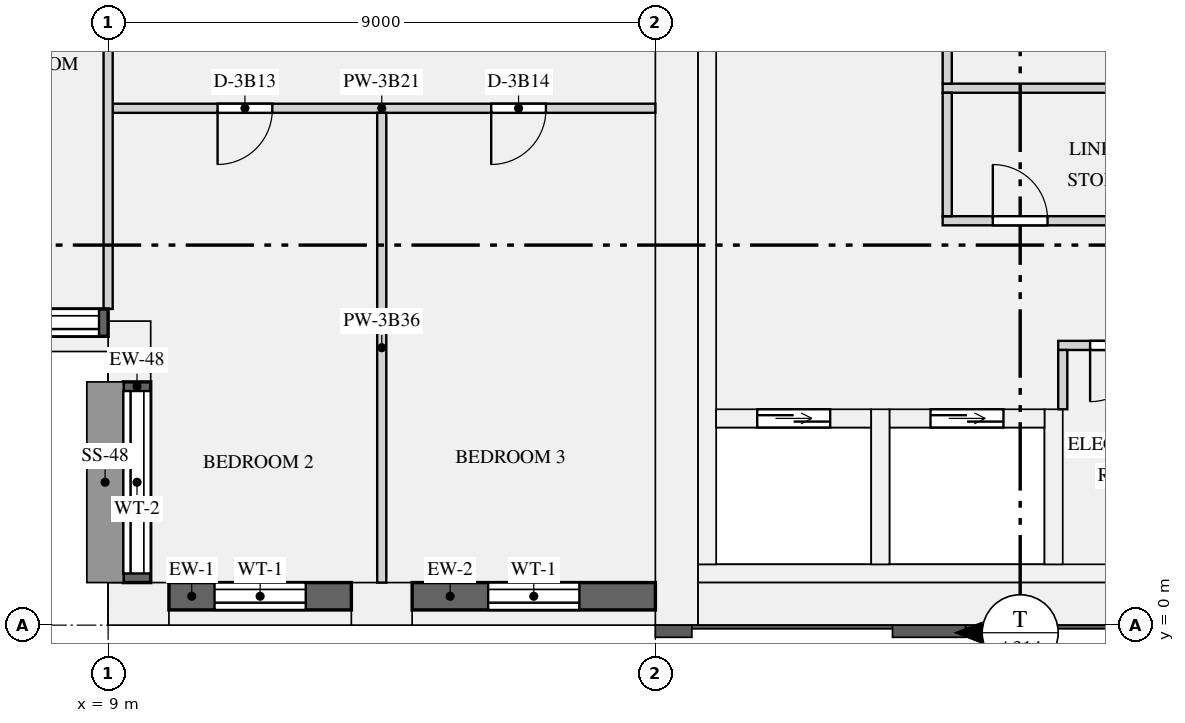
"""IFC4 building model, lengths in metres.
Left out: names, types, materials, properties, quantities, classifications, styles, units other than length and angle.
Written with IfcOpenShell. Run it as: python <this file> out.ifc"""

import sys

from ifc_helpers import new_model, si_unit, direction, frame, frame_2d, origin, origin_2d, place, context, subcontext, project, spatial, rectangle, extrude, element, fill, save


model = new_model("IFC4")
c1 = context("Model", 3, precision=1e-05, world=origin(), true_north=direction((0.0, 1.0)))
c2 = subcontext(c1, "Body", "Model", "MODEL_VIEW")
j1 = project(units=[si_unit("LENGTHUNIT", "METRE"), si_unit("PLANEANGLEUNIT", "RADIAN")], contexts=[c1])
p1 = place(None, origin())
s1 = spatial("IfcSite", under=j1, at=p1, CompositionType="ELEMENT")
p2 = place(p1, origin())
s2 = spatial("IfcBuilding", under=s1, at=p2, CompositionType="ELEMENT")
p3 = place(p2, frame((0.0, 0.0, 150.75)))
s3 = spatial("IfcBuildingStorey", under=s2, at=p3, CompositionType="ELEMENT", Elevation=150.75)
for number, where, z_axis, x_axis in (
    (1, (9.5, 0.35, 0.0), (0.0, 0.0, 1.0), (1.0, 0.0, 0.0)),
    (2, (13.5, 0.35, 0.0), (0.0, 0.0, 1.0), (1.0, 0.0, 0.0)),
    (3, (9.35, 4.5, 0.0), (0.0, 0.0, 1.0), (0.0, -1.0, 0.0)),
):
    element("IfcColumn", number, at=place(p3, frame(where, z_axis=z_axis, x_axis=x_axis)), inside=s3, PredefinedType="USERDEFINED", context=c2, shape_type="SweptSolid", body=[
        extrude(rectangle(XDim=1.0, YDim=0.7, at=origin_2d()), origin(), (0.0, 0.0, 1.0), 3.15),
    ])
p4 = place(p3, frame((18.35, 0.0, 0.0), z_axis=(0.0, 0.0, 1.0), x_axis=(0.0, 1.0, 0.0)))
e4 = element("IfcWall", 4, at=p4, inside=s3, PredefinedType="SHEAR", context=c2, shape_type="SweptSolid", body=[
    extrude(rectangle(XDim=12.5, YDim=0.7, at=frame_2d((6.25, 0.0))), origin(), (0.0, 0.0, 1.0), 3.15),
])
p5 = place(p3, frame((18.7, 0.35, 0.0), z_axis=(0.0, 0.0, 1.0), x_axis=(1.0, 0.0, 0.0)))
e5 = element("IfcWall", 5, at=p5, inside=s3, PredefinedType="SHEAR", context=c2, shape_type="SweptSolid", body=[
    extrude(rectangle(XDim=34.6, YDim=0.7, at=frame_2d((17.3, 0.0))), origin(), (0.0, 0.0, 1.0), 3.15),
])
p6 = place(p3, frame((18.85, 1.0, 0.0), z_axis=(0.0, 0.0, 1.0), x_axis=(0.0, 1.0, 0.0)))
e6 = element("IfcWall", 6, at=p6, inside=s3, PredefinedType="SHEAR", context=c2, shape_type="SweptSolid", body=[
    extrude(rectangle(XDim=10.9, YDim=0.3, at=frame_2d((5.45, 0.0))), origin(), (0.0, 0.0, 1.0), 3.15),
])
p7 = place(p3, frame((18.7, 0.85, 0.0), z_axis=(0.0, 0.0, 1.0), x_axis=(1.0, 0.0, 0.0)))
e7 = element("IfcWall", 7, at=p7, inside=s3, PredefinedType="SHEAR", context=c2, shape_type="SweptSolid", body=[
    extrude(rectangle(XDim=34.6, YDim=0.3, at=frame_2d((17.3, 0.0))), origin(), (0.0, 0.0, 1.0), 3.15),
])
p8 = place(p3, frame((19.0, 3.4, 0.0), z_axis=(0.0, 0.0, 1.0), x_axis=(1.0, 0.0, 0.0)))
e8 = element("IfcWall", 8, at=p8, inside=s3, PredefinedType="SHEAR", context=c2, shape_type="SweptSolid", body=[
    extrude(rectangle(XDim=2.55, YDim=0.3, at=frame_2d((1.275, 0.0))), origin(), (0.0, 0.0, 1.0), 3.15),
])
p9 = place(p8, frame((0.675, 0.0, 0.0)))
e9 = element("IfcOpeningElement", 9, at=p9, cuts=e8, PredefinedType="OPENING", context=c2, shape_type="SweptSolid", body=[
    extrude(rectangle(XDim=1.2, YDim=2.1, at=frame_2d((0.6, 1.05))), frame((0.0, 0.16, 0.0), z_axis=(0.0, -1.0, 0.0), x_axis=(1.0, 0.0, 0.0)), (0.0, 0.0, 1.0), 0.32),
])
p10 = place(p3, frame((21.85, 3.4, 0.0), z_axis=(0.0, 0.0, 1.0), x_axis=(1.0, 0.0, 0.0)))
e10 = element("IfcWall", 10, at=p10, inside=s3, PredefinedType="SHEAR", context=c2, shape_type="SweptSolid", body=[
    extrude(rectangle(XDim=2.55, YDim=0.3, at=frame_2d((1.275, 0.0))), origin(), (0.0, 0.0, 1.0), 3.15),
])
p11 = place(p10, frame((0.675, 0.0, 0.0)))
e11 = element("IfcOpeningElement", 11, at=p11, cuts=e10, PredefinedType="OPENING", context=c2, shape_type="SweptSolid", body=[
    extrude(rectangle(XDim=1.2, YDim=2.1, at=frame_2d((0.6, 1.05))), frame((0.0, 0.16, 0.0), z_axis=(0.0, -1.0, 0.0), x_axis=(1.0, 0.0, 0.0)), (0.0, 0.0, 1.0), 0.32),
])
for number, where, z_axis, x_axis in (
    (12, (21.7, 1.0, 0.0), (0.0, 0.0, 1.0), (0.0, 1.0, 0.0)),
    (13, (24.55, 1.0, 0.0), (0.0, 0.0, 1.0), (0.0, 1.0, 0.0)),
):
    element("IfcWall", number, at=place(p3, frame(where, z_axis=z_axis, x_axis=x_axis)), inside=s3, PredefinedType="SHEAR", context=c2, shape_type="SweptSolid", body=[
        extrude(rectangle(XDim=2.55, YDim=0.3, at=frame_2d((1.275, 0.0))), origin(), (0.0, 0.0, 1.0), 3.15),
    ])
p12 = place(p3, frame((10.0, 0.475, 0.9), z_axis=(0.0, 0.0, 1.0), x_axis=(1.0, 0.0, 0.0)))
e14 = element("IfcWall", 14, at=p12, inside=s3, PredefinedType="SOLIDWALL", context=c2, shape_type="SweptSolid", body=[
    extrude(rectangle(XDim=3.0, YDim=0.45, at=frame_2d((1.5, 0.0))), origin(), (0.0, 0.0, 1.0), 1.93),
])
p13 = place(p12, frame((0.75, 0.0, 0.15)))
e15 = element("IfcOpeningElement", 15, at=p13, cuts=e14, PredefinedType="OPENING", context=c2, shape_type="SweptSolid", body=[
    extrude(rectangle(XDim=1.5, YDim=1.5, at=frame_2d((0.75, 0.75))), frame((0.0, 0.235, 0.0), z_axis=(0.0, -1.0, 0.0), x_axis=(1.0, 0.0, 0.0)), (0.0, 0.0, 1.0), 0.47),
])
p14 = place(p3, frame((14.0, 0.475, 0.9), z_axis=(0.0, 0.0, 1.0), x_axis=(1.0, 0.0, 0.0)))
e16 = element("IfcWall", 16, at=p14, inside=s3, PredefinedType="SOLIDWALL", context=c2, shape_type="SweptSolid", body=[
    extrude(rectangle(XDim=4.0, YDim=0.45, at=frame_2d((2.0, 0.0))), origin(), (0.0, 0.0, 1.0), 1.93),
])
p15 = place(p14, frame((1.25, 0.0, 0.15)))
e17 = element("IfcOpeningElement", 17, at=p15, cuts=e16, PredefinedType="OPENING", context=c2, shape_type="SweptSolid", body=[
    extrude(rectangle(XDim=1.5, YDim=1.5, at=frame_2d((0.75, 0.75))), frame((0.0, 0.235, 0.0), z_axis=(0.0, -1.0, 0.0), x_axis=(1.0, 0.0, 0.0)), (0.0, 0.0, 1.0), 0.47),
])
p16 = place(p3, frame((5.5, 4.975, 0.9), z_axis=(0.0, 0.0, 1.0), x_axis=(1.0, 0.0, 0.0)))
e18 = element("IfcWall", 18, at=p16, inside=s3, PredefinedType="SOLIDWALL", context=c2, shape_type="SweptSolid", body=[
    extrude(rectangle(XDim=3.5, YDim=0.45, at=frame_2d((1.75, 0.0))), origin(), (0.0, 0.0, 1.0), 1.93),
])
p17 = place(p16, frame((0.15, 0.0, 0.15)))
e19 = element("IfcOpeningElement", 19, at=p17, cuts=e18, PredefinedType="OPENING", context=c2, shape_type="SweptSolid", body=[
    extrude(rectangle(XDim=3.2, YDim=1.5, at=frame_2d((1.6, 0.75))), frame((0.0, 0.235, 0.0), z_axis=(0.0, -1.0, 0.0), x_axis=(1.0, 0.0, 0.0)), (0.0, 0.0, 1.0), 0.47),
])
p18 = place(p3, frame((9.475, 4.0, 0.9), z_axis=(0.0, 0.0, 1.0), x_axis=(0.0, -1.0, 0.0)))
e20 = element("IfcWall", 20, at=p18, inside=s3, PredefinedType="SOLIDWALL", context=c2, shape_type="SweptSolid", body=[
    extrude(rectangle(XDim=3.3, YDim=0.45, at=frame_2d((1.65, 0.0))), origin(), (0.0, 0.0, 1.0), 1.93),
])
p19 = place(p18, frame((0.15, 0.0, 0.15)))
e21 = element("IfcOpeningElement", 21, at=p19, cuts=e20, PredefinedType="OPENING", context=c2, shape_type="SweptSolid", body=[
    extrude(rectangle(XDim=3.0, YDim=1.5, at=frame_2d((1.5, 0.75))), frame((0.0, 0.235, 0.0), z_axis=(0.0, -1.0, 0.0), x_axis=(1.0, 0.0, 0.0)), (0.0, 0.0, 1.0), 0.47),
])
p20 = place(p3, frame((24.625, 4.6, 0.0), z_axis=(0.0, 0.0, 1.0), x_axis=(1.0, 0.0, 0.0)))
e22 = element("IfcWall", 22, at=p20, inside=s3, PredefinedType="PARTITIONING", context=c2, shape_type="SweptSolid", body=[
    extrude(rectangle(XDim=2.675, YDim=0.15, at=frame_2d((1.337, 0.0))), origin(), (0.0, 0.0, 1.0), 2.83),
])
p21 = place(p20, frame((0.525, 0.0, 0.0)))
e23 = element("IfcOpeningElement", 23, at=p21, cuts=e22, PredefinedType="OPENING", context=c2, shape_type="SweptSolid", body=[
    extrude(rectangle(XDim=0.9, YDim=2.1, at=frame_2d((0.45, 1.05))), frame((0.0, 0.085, 0.0), z_axis=(0.0, -1.0, 0.0), x_axis=(1.0, 0.0, 0.0)), (0.0, 0.0, 1.0), 0.17),
])
p22 = place(p3, frame((22.725, 6.65, 0.0), z_axis=(0.0, 0.0, 1.0), x_axis=(1.0, 0.0, 0.0)))
e24 = element("IfcWall", 24, at=p22, inside=s3, PredefinedType="PARTITIONING", context=c2, shape_type="SweptSolid", body=[
    extrude(rectangle(XDim=19.8, YDim=0.15, at=frame_2d((9.9, 0.0))), origin(), (0.0, 0.0, 1.0), 2.83),
])
p23 = place(p22, frame((0.825, 0.0, 0.0)))
e25 = element("IfcOpeningElement", 25, at=p23, cuts=e24, PredefinedType="OPENING", context=c2, shape_type="SweptSolid", body=[
    extrude(rectangle(XDim=0.9, YDim=2.1, at=frame_2d((0.45, 1.05))), frame((0.0, 0.085, 0.0), z_axis=(0.0, -1.0, 0.0), x_axis=(1.0, 0.0, 0.0)), (0.0, 0.0, 1.0), 0.17),
])
p24 = place(p22, frame((4.825, 0.0, 0.0)))
e26 = element("IfcOpeningElement", 26, at=p24, cuts=e24, PredefinedType="OPENING", context=c2, shape_type="SweptSolid", body=[
    extrude(rectangle(XDim=0.9, YDim=2.1, at=frame_2d((0.45, 1.05))), frame((0.0, 0.085, 0.0), z_axis=(0.0, -1.0, 0.0), x_axis=(1.0, 0.0, 0.0)), (0.0, 0.0, 1.0), 0.17),
])
p25 = place(p22, frame((9.825, 0.0, 0.0)))
e27 = element("IfcOpeningElement", 27, at=p25, cuts=e24, PredefinedType="OPENING", context=c2, shape_type="SweptSolid", body=[
    extrude(rectangle(XDim=0.9, YDim=2.1, at=frame_2d((0.45, 1.05))), frame((0.0, 0.085, 0.0), z_axis=(0.0, -1.0, 0.0), x_axis=(1.0, 0.0, 0.0)), (0.0, 0.0, 1.0), 0.17),
])
p26 = place(p22, frame((14.475, 0.0, 0.0)))
e28 = element("IfcOpeningElement", 28, at=p26, cuts=e24, PredefinedType="OPENING", context=c2, shape_type="SweptSolid", body=[
    extrude(rectangle(XDim=0.9, YDim=2.1, at=frame_2d((0.45, 1.05))), frame((0.0, 0.085, 0.0), z_axis=(0.0, -1.0, 0.0), x_axis=(1.0, 0.0, 0.0)), (0.0, 0.0, 1.0), 0.17),
])
p27 = place(p3, frame((22.725, 8.83, 0.0), z_axis=(0.0, 0.0, 1.0), x_axis=(1.0, 0.0, 0.0)))
e29 = element("IfcWall", 29, at=p27, inside=s3, PredefinedType="PARTITIONING", context=c2, shape_type="SweptSolid", body=[
    extrude(rectangle(XDim=8.96, YDim=0.15, at=frame_2d((4.48, 0.0))), origin(), (0.0, 0.0, 1.0), 2.83),
])
p28 = place(p3, frame((24.7, 3.55, 0.0), z_axis=(0.0, 0.0, 1.0), x_axis=(0.0, 1.0, 0.0)))
e30 = element("IfcWall", 30, at=p28, inside=s3, PredefinedType="PARTITIONING", context=c2, shape_type="SweptSolid", body=[
    extrude(rectangle(XDim=0.975, YDim=0.15, at=frame_2d((0.487, 0.0))), origin(), (0.0, 0.0, 1.0), 2.83),
])
p29 = place(p3, frame((22.8, 6.725, 0.0), z_axis=(0.0, 0.0, 1.0), x_axis=(0.0, 1.0, 0.0)))
e31 = element("IfcWall", 31, at=p29, inside=s3, PredefinedType="PARTITIONING", context=c2, shape_type="SweptSolid", body=[
    extrude(rectangle(XDim=2.03, YDim=0.15, at=frame_2d((1.015, 0.0))), origin(), (0.0, 0.0, 1.0), 2.83),
])
p30 = place(p3, frame((22.8, 8.905, 0.0), z_axis=(0.0, 0.0, 1.0), x_axis=(0.0, 1.0, 0.0)))
e32 = element("IfcWall", 32, at=p30, inside=s3, PredefinedType="PARTITIONING", context=c2, shape_type="SweptSolid", body=[
    extrude(rectangle(XDim=2.995, YDim=0.15, at=frame_2d((1.498, 0.0))), origin(), (0.0, 0.0, 1.0), 2.83),
])
p31 = place(p3, frame((9.075, 8.5, 0.0), z_axis=(0.0, 0.0, 1.0), x_axis=(1.0, 0.0, 0.0)))
e33 = element("IfcWall", 33, at=p31, inside=s3, PredefinedType="PARTITIONING", context=c2, shape_type="SweptSolid", body=[
    extrude(rectangle(XDim=8.925, YDim=0.15, at=frame_2d((4.462, 0.0))), origin(), (0.0, 0.0, 1.0), 2.83),
])
p32 = place(p31, frame((1.725, 0.0, 0.0)))
e34 = element("IfcOpeningElement", 34, at=p32, cuts=e33, PredefinedType="OPENING", context=c2, shape_type="SweptSolid", body=[
    extrude(rectangle(XDim=0.9, YDim=2.1, at=frame_2d((0.45, 1.05))), frame((0.0, 0.085, 0.0), z_axis=(0.0, -1.0, 0.0), x_axis=(1.0, 0.0, 0.0)), (0.0, 0.0, 1.0), 0.17),
])
p33 = place(p31, frame((6.225, 0.0, 0.0)))
e35 = element("IfcOpeningElement", 35, at=p33, cuts=e33, PredefinedType="OPENING", context=c2, shape_type="SweptSolid", body=[
    extrude(rectangle(XDim=0.9, YDim=2.1, at=frame_2d((0.45, 1.05))), frame((0.0, 0.085, 0.0), z_axis=(0.0, -1.0, 0.0), x_axis=(1.0, 0.0, 0.0)), (0.0, 0.0, 1.0), 0.17),
])
p34 = place(p3, frame((13.5, 0.7, 0.0), z_axis=(0.0, 0.0, 1.0), x_axis=(0.0, 1.0, 0.0)))
e36 = element("IfcWall", 36, at=p34, inside=s3, PredefinedType="PARTITIONING", context=c2, shape_type="SweptSolid", body=[
    extrude(rectangle(XDim=7.725, YDim=0.15, at=frame_2d((3.863, 0.0))), origin(), (0.0, 0.0, 1.0), 2.83),
])
p35 = place(p3, frame((9.0, 5.2, 0.0), z_axis=(0.0, 0.0, 1.0), x_axis=(0.0, 1.0, 0.0)))
e37 = element("IfcWall", 37, at=p35, inside=s3, PredefinedType="PARTITIONING", context=c2, shape_type="SweptSolid", body=[
    extrude(rectangle(XDim=11.225, YDim=0.15, at=frame_2d((5.613, 0.0))), origin(), (0.0, 0.0, 1.0), 2.83),
])
p36 = place(p35, frame((4.575, 0.0, 0.0)))
e38 = element("IfcOpeningElement", 38, at=p36, cuts=e37, PredefinedType="OPENING", context=c2, shape_type="SweptSolid", body=[
    extrude(rectangle(XDim=0.9, YDim=2.1, at=frame_2d((0.45, 1.05))), frame((0.0, 0.085, 0.0), z_axis=(0.0, -1.0, 0.0), x_axis=(1.0, 0.0, 0.0)), (0.0, 0.0, 1.0), 0.17),
])
p37 = place(p13, origin())
e39 = element("IfcWindow", 39, at=p37, inside=s3, PartitioningType="SINGLE_PANEL", PredefinedType="WINDOW", context=c2, shape_type="SweptSolid", body=[
    extrude(rectangle(XDim=1.5, YDim=1.5, at=frame_2d((0.75, 0.75))), frame((0.0, -0.065, 0.0), z_axis=(0.0, -1.0, 0.0), x_axis=(1.0, 0.0, 0.0)), (0.0, 0.0, 1.0), 0.06),
])
fill(e15, e39)
p38 = place(p15, origin())
e40 = element("IfcWindow", 40, at=p38, inside=s3, PartitioningType="SINGLE_PANEL", PredefinedType="WINDOW", context=c2, shape_type="SweptSolid", body=[
    extrude(rectangle(XDim=1.5, YDim=1.5, at=frame_2d((0.75, 0.75))), frame((0.0, -0.065, 0.0), z_axis=(0.0, -1.0, 0.0), x_axis=(1.0, 0.0, 0.0)), (0.0, 0.0, 1.0), 0.06),
])
fill(e17, e40)
p39 = place(p17, origin())
e41 = element("IfcWindow", 41, at=p39, inside=s3, PartitioningType="SINGLE_PANEL", PredefinedType="WINDOW", context=c2, shape_type="SweptSolid", body=[
    extrude(rectangle(XDim=3.2, YDim=1.5, at=frame_2d((1.6, 0.75))), frame((0.0, -0.065, 0.0), z_axis=(0.0, -1.0, 0.0), x_axis=(1.0, 0.0, 0.0)), (0.0, 0.0, 1.0), 0.06),
])
fill(e19, e41)
p40 = place(p19, origin())
e42 = element("IfcWindow", 42, at=p40, inside=s3, PartitioningType="SINGLE_PANEL", PredefinedType="WINDOW", context=c2, shape_type="SweptSolid", body=[
    extrude(rectangle(XDim=3.0, YDim=1.5, at=frame_2d((1.5, 0.75))), frame((0.0, -0.065, 0.0), z_axis=(0.0, -1.0, 0.0), x_axis=(1.0, 0.0, 0.0)), (0.0, 0.0, 1.0), 0.06),
])
fill(e21, e42)
p41 = place(p9, origin())
e43 = element("IfcDoor", 43, at=p41, inside=s3, OperationType="DOUBLE_DOOR_SLIDING", PredefinedType="DOOR", context=c2, shape_type="SweptSolid", body=[
    extrude(rectangle(XDim=1.2, YDim=2.1, at=frame_2d((0.6, 1.05))), frame((0.0, 0.025, 0.0), z_axis=(0.0, -1.0, 0.0), x_axis=(1.0, 0.0, 0.0)), (0.0, 0.0, 1.0), 0.05),
])
fill(e9, e43)
p42 = place(p11, origin())
e44 = element("IfcDoor", 44, at=p42, inside=s3, OperationType="DOUBLE_DOOR_SLIDING", PredefinedType="DOOR", context=c2, shape_type="SweptSolid", body=[
    extrude(rectangle(XDim=1.2, YDim=2.1, at=frame_2d((0.6, 1.05))), frame((0.0, 0.025, 0.0), z_axis=(0.0, -1.0, 0.0), x_axis=(1.0, 0.0, 0.0)), (0.0, 0.0, 1.0), 0.05),
])
fill(e11, e44)
p43 = place(p21, frame((0.9, 0.0, 0.0), z_axis=(0.0, 0.0, 1.0), x_axis=(-1.0, 0.0, 0.0)))
e45 = element("IfcDoor", 45, at=p43, inside=s3, OperationType="SINGLE_SWING_RIGHT", PredefinedType="DOOR", context=c2, shape_type="SweptSolid", body=[
    extrude(rectangle(XDim=0.9, YDim=2.1, at=frame_2d((0.45, 1.05))), frame((0.0, 0.025, 0.0), z_axis=(0.0, -1.0, 0.0), x_axis=(1.0, 0.0, 0.0)), (0.0, 0.0, 1.0), 0.05),
])
fill(e23, e45)
p44 = place(p23, origin())
e46 = element("IfcDoor", 46, at=p44, inside=s3, OperationType="SINGLE_SWING_LEFT", PredefinedType="DOOR", context=c2, shape_type="SweptSolid", body=[
    extrude(rectangle(XDim=0.9, YDim=2.1, at=frame_2d((0.45, 1.05))), frame((0.0, 0.025, 0.0), z_axis=(0.0, -1.0, 0.0), x_axis=(1.0, 0.0, 0.0)), (0.0, 0.0, 1.0), 0.05),
])
fill(e25, e46)
p45 = place(p32, frame((0.9, 0.0, 0.0), z_axis=(0.0, 0.0, 1.0), x_axis=(-1.0, 0.0, 0.0)))
e47 = element("IfcDoor", 47, at=p45, inside=s3, OperationType="SINGLE_SWING_RIGHT", PredefinedType="DOOR", context=c2, shape_type="SweptSolid", body=[
    extrude(rectangle(XDim=0.9, YDim=2.1, at=frame_2d((0.45, 1.05))), frame((0.0, 0.025, 0.0), z_axis=(0.0, -1.0, 0.0), x_axis=(1.0, 0.0, 0.0)), (0.0, 0.0, 1.0), 0.05),
])
fill(e34, e47)
p46 = place(p33, frame((0.9, 0.0, 0.0), z_axis=(0.0, 0.0, 1.0), x_axis=(-1.0, 0.0, 0.0)))
e48 = element("IfcDoor", 48, at=p46, inside=s3, OperationType="SINGLE_SWING_RIGHT", PredefinedType="DOOR", context=c2, shape_type="SweptSolid", body=[
    extrude(rectangle(XDim=0.9, YDim=2.1, at=frame_2d((0.45, 1.05))), frame((0.0, 0.025, 0.0), z_axis=(0.0, -1.0, 0.0), x_axis=(1.0, 0.0, 0.0)), (0.0, 0.0, 1.0), 0.05),
])
fill(e35, e48)
save(model, sys.argv[1])
